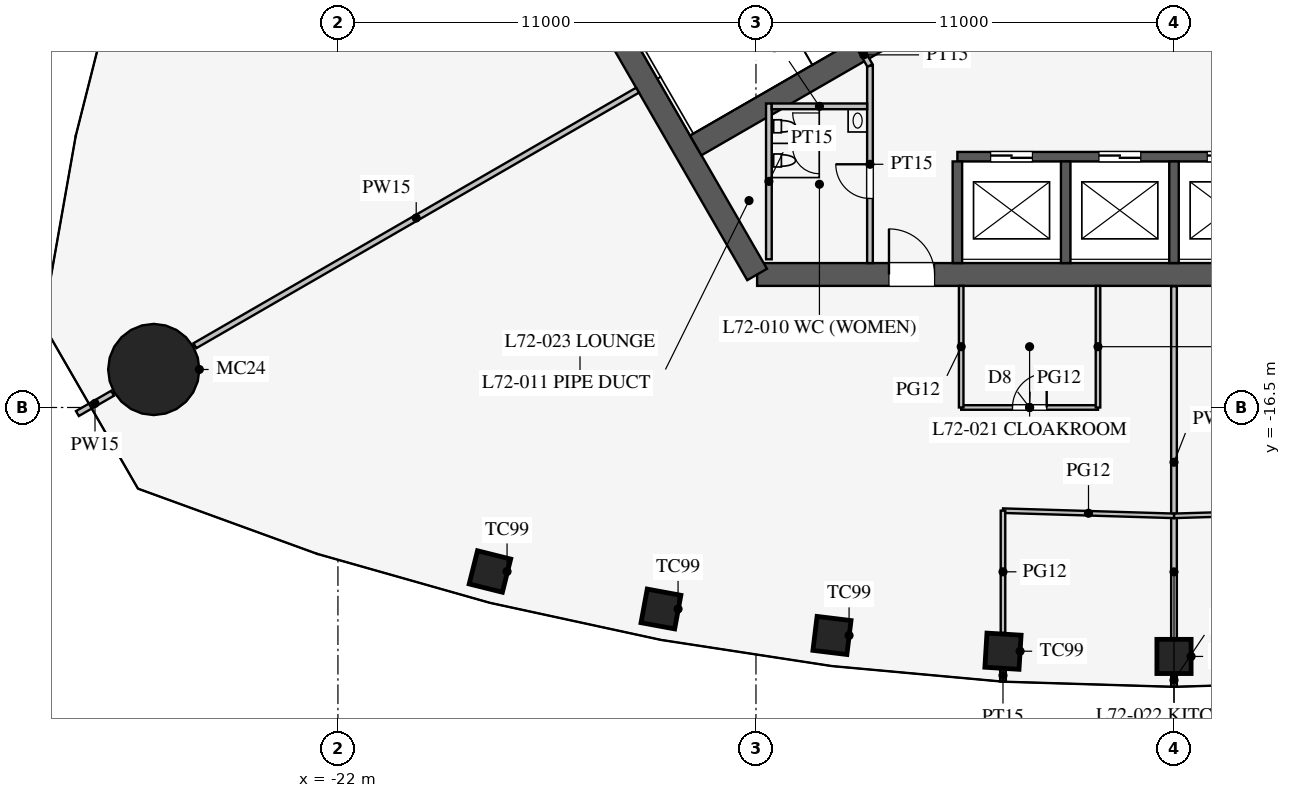
"""IFC4 building model, lengths in metres.
Left out: names, types, materials, properties, quantities, classifications, styles, units other than length and angle.
Written with IfcOpenShell. Run it as: python <this file> out.ifc"""

import sys

from ifc_helpers import new_model, si_unit, direction, frame, frame_2d, origin, origin_2d, place, context, subcontext, project, spatial, rectangle, circle, extrude, element, fill, save


model = new_model("IFC4")
c1 = context("Model", 3, precision=1e-05, world=origin(), true_north=direction((0.0, 1.0)))
c2 = subcontext(c1, "Body", "Model", "MODEL_VIEW")
j1 = project(units=[si_unit("LENGTHUNIT", "METRE"), si_unit("PLANEANGLEUNIT", "RADIAN")], contexts=[c1])
p1 = place(None, origin())
s1 = spatial("IfcSite", under=j1, at=p1, CompositionType="ELEMENT")
p2 = place(p1, origin())
s2 = spatial("IfcBuilding", under=s1, at=p2, CompositionType="ELEMENT")
p3 = place(p2, frame((0.0, 0.0, 314.1)))
s3 = spatial("IfcBuildingStorey", under=s2, at=p3, CompositionType="ELEMENT", Elevation=314.1)
for number, where, z_axis, x_axis in (
    (1, (-18.0, -20.816, 0.0), (0.0, 0.0, 1.0), (0.97, -0.242, 0.0)),
    (2, (-13.5, -21.803, 0.0), (0.0, 0.0, 1.0), (0.983, -0.182, 0.0)),
    (3, (-9.0, -22.499, 0.0), (0.0, 0.0, 1.0), (0.993, -0.121, 0.0)),
    (4, (-4.5, -22.914, 0.0), (0.0, 0.0, 1.0), (0.998, -0.061, 0.0)),
    (5, (0.0, -23.052, 0.0), (0.0, 0.0, 1.0), (1.0, 0.0, 0.0)),
):
    element("IfcColumn", number, at=place(p3, frame(where, z_axis=z_axis, x_axis=x_axis)), inside=s3, PredefinedType="COLUMN", context=c2, shape_type="SweptSolid", body=[
        extrude(rectangle(XDim=0.9, YDim=0.9, at=origin_2d()), origin(), (0.0, 0.0, 1.0), 4.2),
    ])
p4 = place(p3, frame((-26.847, -15.5, 0.0), z_axis=(0.0, 0.0, 1.0), x_axis=(1.0, 0.0, 0.0)))
e6 = element("IfcColumn", 6, at=p4, inside=s3, PredefinedType="COLUMN", context=c2, shape_type="SweptSolid", body=[
    extrude(circle(Radius=1.2, at=origin_2d()), origin(), (0.0, 0.0, 1.0), 4.2),
])
p5 = place(p3, frame((-10.97, -13.0, 0.0), z_axis=(0.0, 0.0, 1.0), x_axis=(1.0, 0.0, 0.0)))
e7 = element("IfcWall", 7, at=p5, inside=s3, PredefinedType="SHEAR", context=c2, shape_type="SweptSolid", body=[
    extrude(rectangle(XDim=21.939, YDim=0.6, at=frame_2d((10.97, 0.0))), origin(), (0.0, 0.0, 1.0), 4.2),
])
p6 = place(p5, frame((17.27, 0.0, 0.0)))
e8 = element("IfcOpeningElement", 8, at=p6, cuts=e7, PredefinedType="OPENING", context=c2, shape_type="SweptSolid", body=[
    extrude(rectangle(XDim=1.2, YDim=2.1, at=frame_2d((0.6, 1.05))), frame((0.0, 0.31, 0.0), z_axis=(0.0, -1.0, 0.0), x_axis=(1.0, 0.0, 0.0)), (0.0, 0.0, 1.0), 0.62),
])
p7 = place(p5, frame((3.47, 0.0, 0.0)))
e9 = element("IfcOpeningElement", 9, at=p7, cuts=e7, PredefinedType="OPENING", context=c2, shape_type="SweptSolid", body=[
    extrude(rectangle(XDim=1.2, YDim=2.1, at=frame_2d((0.6, 1.05))), frame((0.0, 0.31, 0.0), z_axis=(0.0, -1.0, 0.0), x_axis=(1.0, 0.0, 0.0)), (0.0, 0.0, 1.0), 0.62),
])
p8 = place(p3, frame((-16.743, -3.0, 0.0), z_axis=(0.0, 0.0, 1.0), x_axis=(0.499995765644, -0.866027848477, 0.0)))
e10 = element("IfcWall", 10, at=p8, inside=s3, PredefinedType="SHEAR", context=c2, shape_type="SweptSolid", body=[
    extrude(rectangle(XDim=11.547, YDim=0.6, at=frame_2d((5.773, 0.0))), origin(), (0.0, 0.0, 1.0), 4.2),
])
p9 = place(p3, frame((-5.7, -9.9, 0.0), z_axis=(0.0, 0.0, 1.0), x_axis=(1.0, 0.0, 0.0)))
e11 = element("IfcWall", 11, at=p9, inside=s3, PredefinedType="SHEAR", context=c2, shape_type="SweptSolid", body=[
    extrude(rectangle(XDim=11.4, YDim=0.25, at=frame_2d((5.7, 0.0))), origin(), (0.0, 0.0, 1.0), 4.2),
])
p10 = place(p9, frame((0.875, 0.0, 0.0)))
e12 = element("IfcOpeningElement", 12, at=p10, cuts=e11, PredefinedType="OPENING", context=c2, shape_type="SweptSolid", body=[
    extrude(rectangle(XDim=1.1, YDim=2.2, at=frame_2d((0.55, 1.1))), frame((0.0, 0.135, 0.0), z_axis=(0.0, -1.0, 0.0), x_axis=(1.0, 0.0, 0.0)), (0.0, 0.0, 1.0), 0.27),
])
p11 = place(p9, frame((3.725, 0.0, 0.0)))
e13 = element("IfcOpeningElement", 13, at=p11, cuts=e11, PredefinedType="OPENING", context=c2, shape_type="SweptSolid", body=[
    extrude(rectangle(XDim=1.1, YDim=2.2, at=frame_2d((0.55, 1.1))), frame((0.0, 0.135, 0.0), z_axis=(0.0, -1.0, 0.0), x_axis=(1.0, 0.0, 0.0)), (0.0, 0.0, 1.0), 0.27),
])
p12 = place(p9, frame((6.575, 0.0, 0.0)))
e14 = element("IfcOpeningElement", 14, at=p12, cuts=e11, PredefinedType="OPENING", context=c2, shape_type="SweptSolid", body=[
    extrude(rectangle(XDim=1.1, YDim=2.2, at=frame_2d((0.55, 1.1))), frame((0.0, 0.135, 0.0), z_axis=(0.0, -1.0, 0.0), x_axis=(1.0, 0.0, 0.0)), (0.0, 0.0, 1.0), 0.27),
])
p13 = place(p9, frame((9.425, 0.0, 0.0)))
e15 = element("IfcOpeningElement", 15, at=p13, cuts=e11, PredefinedType="OPENING", context=c2, shape_type="SweptSolid", body=[
    extrude(rectangle(XDim=1.1, YDim=2.2, at=frame_2d((0.55, 1.1))), frame((0.0, 0.135, 0.0), z_axis=(0.0, -1.0, 0.0), x_axis=(1.0, 0.0, 0.0)), (0.0, 0.0, 1.0), 0.27),
])
for number, where, z_axis, x_axis in (
    (16, (-5.7, -10.025, 0.0), (0.0, 0.0, 1.0), (0.0, -1.0, 0.0)),
    (17, (-2.85, -10.025, 0.0), (0.0, 0.0, 1.0), (0.0, -1.0, 0.0)),
    (18, (0.0, -10.025, 0.0), (0.0, 0.0, 1.0), (0.0, -1.0, 0.0)),
):
    element("IfcWall", number, at=place(p3, frame(where, z_axis=z_axis, x_axis=x_axis)), inside=s3, PredefinedType="SHEAR", context=c2, shape_type="SweptSolid", body=[
        extrude(rectangle(XDim=2.675, YDim=0.25, at=frame_2d((1.337, 0.0))), origin(), (0.0, 0.0, 1.0), 4.2),
    ])
p14 = place(p3, frame((-4.638, -5.016, 0.0), z_axis=(0.0, 0.0, 1.0), x_axis=(-0.866012320003, -0.50002266109, 0.0)))
e19 = element("IfcWall", 19, at=p14, inside=s3, PredefinedType="SHEAR", context=c2, shape_type="SweptSolid", body=[
    extrude(rectangle(XDim=9.175, YDim=0.6, at=frame_2d((4.587, 0.0))), origin(), (0.0, 0.0, 1.0), 4.2),
])
p15 = place(p3, frame((-8.0, -7.5, 0.0), z_axis=(0.0, 0.0, 1.0), x_axis=(0.0, -1.0, 0.0)))
e20 = element("IfcWall", 20, at=p15, inside=s3, PredefinedType="PARTITIONING", context=c2, shape_type="SweptSolid", body=[
    extrude(rectangle(XDim=5.2, YDim=0.15, at=frame_2d((2.6, 0.0))), origin(), (0.0, 0.0, 1.0), 4.0),
])
p16 = place(p15, frame((2.6, 0.0, 0.0)))
e21 = element("IfcOpeningElement", 21, at=p16, cuts=e20, PredefinedType="OPENING", context=c2, shape_type="SweptSolid", body=[
    extrude(rectangle(XDim=0.9, YDim=2.1, at=frame_2d((0.45, 1.05))), frame((0.0, 0.085, 0.0), z_axis=(0.0, -1.0, 0.0), x_axis=(1.0, 0.0, 0.0)), (0.0, 0.0, 1.0), 0.17),
])
p17 = place(p3, frame((-8.0, -7.5, 0.0), z_axis=(0.0, 0.0, 1.0), x_axis=(-0.499842556608, 0.866116284689, 0.0)))
e22 = element("IfcWall", 22, at=p17, inside=s3, PredefinedType="PARTITIONING", context=c2, shape_type="SweptSolid", body=[
    extrude(rectangle(XDim=0.645, YDim=0.15, at=frame_2d((0.323, 0.0))), origin(), (0.0, 0.0, 1.0), 4.0),
])
p18 = place(p3, frame((-10.66, -8.5, 0.0), z_axis=(0.0, 0.0, 1.0), x_axis=(0.0, -1.0, 0.0)))
e23 = element("IfcWall", 23, at=p18, inside=s3, PredefinedType="PARTITIONING", context=c2, shape_type="SweptSolid", body=[
    extrude(rectangle(XDim=4.1, YDim=0.15, at=frame_2d((2.05, 0.0))), origin(), (0.0, 0.0, 1.0), 4.0),
])
p19 = place(p3, frame((-8.075, -8.575, 0.0), z_axis=(0.0, 0.0, 1.0), x_axis=(-1.0, 0.0, 0.0)))
e24 = element("IfcWall", 24, at=p19, inside=s3, PredefinedType="PARTITIONING", context=c2, shape_type="SweptSolid", body=[
    extrude(rectangle(XDim=2.51, YDim=0.15, at=frame_2d((1.255, 0.0))), origin(), (0.0, 0.0, 1.0), 4.0),
])
p20 = place(p3, frame((-14.116, -8.15, 0.0), z_axis=(0.0, 0.0, 1.0), x_axis=(-0.866020541135, -0.500008422262, 0.0)))
e25 = element("IfcWall", 25, at=p20, inside=s3, PredefinedType="PARTITIONING", context=c2, shape_type="SweptSolid", body=[
    extrude(rectangle(XDim=13.45, YDim=0.15, at=frame_2d((6.725, 0.0))), origin(), (0.0, 0.0, 1.0), 2.5),
])
p21 = place(p3, frame((-27.929, -16.125, 0.0), z_axis=(0.0, 0.0, 1.0), x_axis=(-0.866086810508, -0.499893625349, 0.0)))
e26 = element("IfcWall", 26, at=p21, inside=s3, PredefinedType="PARTITIONING", context=c2, shape_type="SweptSolid", body=[
    extrude(rectangle(XDim=1.07, YDim=0.15, at=frame_2d((0.535, 0.0))), origin(), (0.0, 0.0, 1.0), 2.5),
])
p22 = place(p3, frame((0.0, -13.31, 0.0), z_axis=(0.0, 0.0, 1.0), x_axis=(0.0, -1.0, 0.0)))
e27 = element("IfcWall", 27, at=p22, inside=s3, PredefinedType="PARTITIONING", context=c2, shape_type="SweptSolid", body=[
    extrude(rectangle(XDim=9.261, YDim=0.15, at=frame_2d((4.631, 0.0))), origin(), (0.0, 0.0, 1.0), 3.3),
])
p23 = place(p3, frame((-5.6, -16.5, 0.0), z_axis=(0.0, 0.0, 1.0), x_axis=(1.0, 0.0, 0.0)))
e28 = element("IfcWall", 28, at=p23, inside=s3, PredefinedType="PARTITIONING", context=c2, shape_type="SweptSolid", body=[
    extrude(rectangle(XDim=3.6, YDim=0.12, at=frame_2d((1.8, 0.0))), origin(), (0.0, 0.0, 1.0), 2.9),
])
p24 = place(p23, frame((1.35, 0.0, 0.15)))
e29 = element("IfcOpeningElement", 29, at=p24, cuts=e28, PredefinedType="OPENING", context=c2, shape_type="SweptSolid", body=[
    extrude(rectangle(XDim=0.9, YDim=2.1, at=frame_2d((0.45, 1.05))), frame((0.0, 0.07, 0.0), z_axis=(0.0, -1.0, 0.0), x_axis=(1.0, 0.0, 0.0)), (0.0, 0.0, 1.0), 0.14),
])
for number, where, z_axis, x_axis in (
    (30, (-2.0, -13.3, 0.0), (0.0, 0.0, 1.0), (0.0, -1.0, 0.0)),
    (31, (-5.6, -13.3, 0.0), (0.0, 0.0, 1.0), (0.0, -1.0, 0.0)),
):
    element("IfcWall", number, at=place(p3, frame(where, z_axis=z_axis, x_axis=x_axis)), inside=s3, PredefinedType="PARTITIONING", context=c2, shape_type="SweptSolid", body=[
        extrude(rectangle(XDim=3.2, YDim=0.12, at=frame_2d((1.6, 0.0))), origin(), (0.0, 0.0, 1.0), 2.9),
    ])
p25 = place(p3, frame((0.0, -23.506, 0.0), z_axis=(0.0, 0.0, 1.0), x_axis=(0.0, -1.0, 0.0)))
e32 = element("IfcWall", 32, at=p25, inside=s3, PredefinedType="PARTITIONING", context=c2, shape_type="SweptSolid", body=[
    extrude(rectangle(XDim=0.341, YDim=0.15, at=frame_2d((0.17, 0.0))), origin(), (0.0, 0.0, 1.0), 2.9),
])
p26 = place(p3, frame((-4.5, -23.394, 0.0), z_axis=(0.0, 0.0, 1.0), x_axis=(0.0, -1.0, 0.0)))
e33 = element("IfcWall", 33, at=p26, inside=s3, PredefinedType="PARTITIONING", context=c2, shape_type="SweptSolid", body=[
    extrude(rectangle(XDim=0.316, YDim=0.15, at=frame_2d((0.158, 0.0))), origin(), (0.0, 0.0, 1.0), 2.9),
])
p27 = place(p3, frame((0.0, -19.352, 0.0), z_axis=(0.0, 0.0, 1.0), x_axis=(0.999542074227, 0.030259574513, 0.0)))
e34 = element("IfcWall", 34, at=p27, inside=s3, PredefinedType="PARTITIONING", context=c2, shape_type="SweptSolid", body=[
    extrude(rectangle(XDim=4.502, YDim=0.12, at=frame_2d((2.251, 0.0))), origin(), (0.0, 0.0, 1.0), 2.9),
])
p28 = place(p27, frame((1.35, 0.0, 0.15)))
e35 = element("IfcOpeningElement", 35, at=p28, cuts=e34, PredefinedType="OPENING", context=c2, shape_type="SweptSolid", body=[
    extrude(rectangle(XDim=1.8, YDim=2.1, at=frame_2d((0.9, 1.05))), frame((0.0, 0.07, 0.0), z_axis=(0.0, -1.0, 0.0), x_axis=(1.0, 0.0, 0.0)), (0.0, 0.0, 1.0), 0.14),
])
p29 = place(p3, frame((-4.5, -19.215, 0.0), z_axis=(0.0, 0.0, 1.0), x_axis=(0.999542074227, -0.030259574513, 0.0)))
e36 = element("IfcWall", 36, at=p29, inside=s3, PredefinedType="PARTITIONING", context=c2, shape_type="SweptSolid", body=[
    extrude(rectangle(XDim=4.502, YDim=0.12, at=frame_2d((2.251, 0.0))), origin(), (0.0, 0.0, 1.0), 2.9),
])
p30 = place(p3, frame((-4.5, -19.215, 0.0), z_axis=(0.0, 0.0, 1.0), x_axis=(0.0, -1.0, 0.0)))
e37 = element("IfcWall", 37, at=p30, inside=s3, PredefinedType="PARTITIONING", context=c2, shape_type="SweptSolid", body=[
    extrude(rectangle(XDim=3.218, YDim=0.12, at=frame_2d((1.609, 0.0))), origin(), (0.0, 0.0, 1.0), 2.9),
])
p31 = place(p16, frame((0.9, 0.0, 0.0), z_axis=(0.0, 0.0, 1.0), x_axis=(-1.0, 0.0, 0.0)))
e38 = element("IfcDoor", 38, at=p31, inside=s3, OperationType="SINGLE_SWING_RIGHT", PredefinedType="DOOR", context=c2, shape_type="SweptSolid", body=[
    extrude(rectangle(XDim=0.9, YDim=2.1, at=frame_2d((0.45, 1.05))), frame((0.0, 0.025, 0.0), z_axis=(0.0, -1.0, 0.0), x_axis=(1.0, 0.0, 0.0)), (0.0, 0.0, 1.0), 0.05),
])
fill(e21, e38)
p32 = place(p7, origin())
e39 = element("IfcDoor", 39, at=p32, inside=s3, OperationType="SINGLE_SWING_LEFT", PredefinedType="DOOR", context=c2, shape_type="SweptSolid", body=[
    extrude(rectangle(XDim=1.2, YDim=2.1, at=frame_2d((0.6, 1.05))), frame((0.0, 0.025, 0.0), z_axis=(0.0, -1.0, 0.0), x_axis=(1.0, 0.0, 0.0)), (0.0, 0.0, 1.0), 0.05),
])
fill(e9, e39)
p33 = place(p24, origin())
e40 = element("IfcDoor", 40, at=p33, inside=s3, OperationType="SINGLE_SWING_RIGHT", PredefinedType="DOOR", context=c2, shape_type="SweptSolid", body=[
    extrude(rectangle(XDim=0.9, YDim=2.1, at=frame_2d((0.45, 1.05))), frame((0.0, 0.025, 0.0), z_axis=(0.0, -1.0, 0.0), x_axis=(1.0, 0.0, 0.0)), (0.0, 0.0, 1.0), 0.05),
])
fill(e29, e40)
p34 = place(p10, origin())
e41 = element("IfcDoor", 41, at=p34, inside=s3, OperationType="DOUBLE_DOOR_SLIDING", PredefinedType="DOOR", context=c2, shape_type="SweptSolid", body=[
    extrude(rectangle(XDim=1.1, YDim=2.2, at=frame_2d((0.55, 1.1))), frame((0.0, 0.025, 0.0), z_axis=(0.0, -1.0, 0.0), x_axis=(1.0, 0.0, 0.0)), (0.0, 0.0, 1.0), 0.05),
])
fill(e12, e41)
p35 = place(p11, origin())
e42 = element("IfcDoor", 42, at=p35, inside=s3, OperationType="DOUBLE_DOOR_SLIDING", PredefinedType="DOOR", context=c2, shape_type="SweptSolid", body=[
    extrude(rectangle(XDim=1.1, YDim=2.2, at=frame_2d((0.55, 1.1))), frame((0.0, 0.025, 0.0), z_axis=(0.0, -1.0, 0.0), x_axis=(1.0, 0.0, 0.0)), (0.0, 0.0, 1.0), 0.05),
])
fill(e13, e42)
p36 = place(p12, origin())
e43 = element("IfcDoor", 43, at=p36, inside=s3, OperationType="DOUBLE_DOOR_SLIDING", PredefinedType="DOOR", context=c2, shape_type="SweptSolid", body=[
    extrude(rectangle(XDim=1.1, YDim=2.2, at=frame_2d((0.55, 1.1))), frame((0.0, 0.025, 0.0), z_axis=(0.0, -1.0, 0.0), x_axis=(1.0, 0.0, 0.0)), (0.0, 0.0, 1.0), 0.05),
])
fill(e14, e43)
save(model, sys.argv[1])
